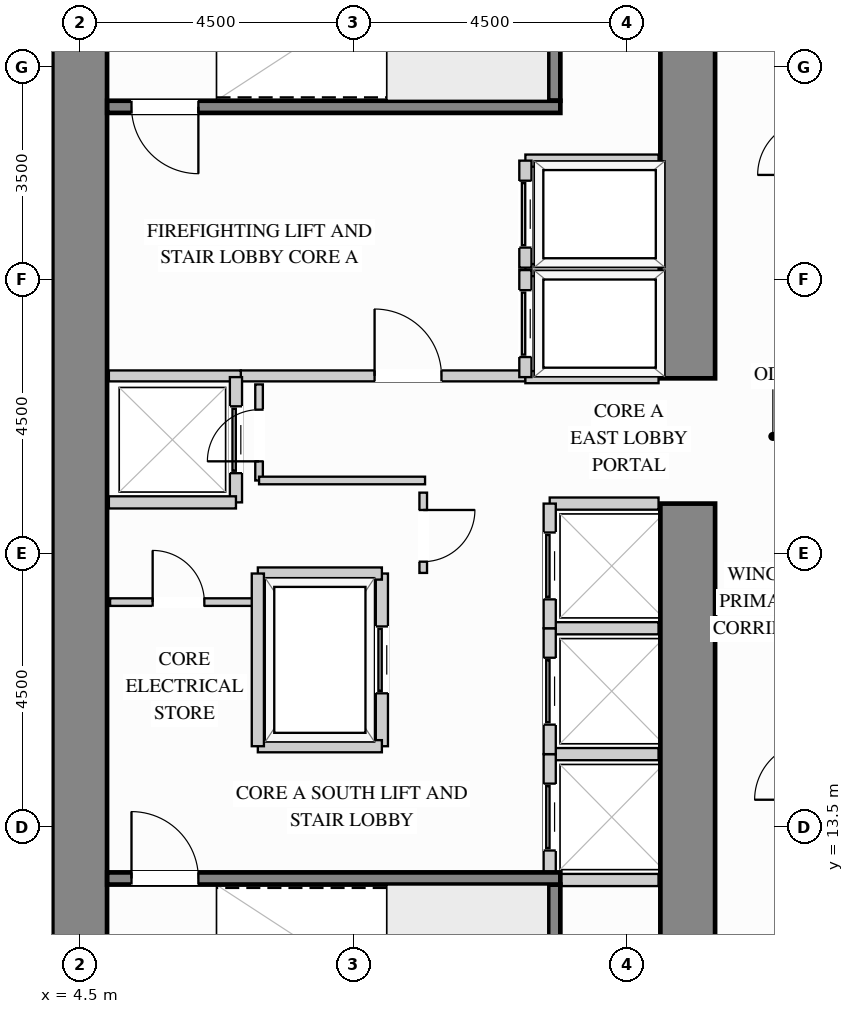
"""IFC4 building model, lengths in metres.
Left out: names, types, materials, properties, quantities, classifications, styles, units other than length and angle.
Written with IfcOpenShell. Run it as: python <this file> out.ifc"""

import sys

from ifc_helpers import new_model, si_unit, direction, frame, frame_2d, origin, place, context, subcontext, project, spatial, rectangle, extrude, source, transform, mapped, element, fill, save


model = new_model("IFC4")
c1 = context("Model", 3, precision=1e-05, world=origin(), true_north=direction((0.0, 1.0)))
c2 = subcontext(c1, "Body", "Model", "MODEL_VIEW")
j1 = project(units=[si_unit("LENGTHUNIT", "METRE"), si_unit("PLANEANGLEUNIT", "RADIAN")], contexts=[c1])
p1 = place(None, origin())
s1 = spatial("IfcSite", under=j1, at=p1, CompositionType="ELEMENT")
p2 = place(p1, origin())
s2 = spatial("IfcBuilding", under=s1, at=p2, CompositionType="ELEMENT")
p3 = place(p2, frame((0.0, 0.0, 22.5)))
s3 = spatial("IfcBuildingStorey", under=s2, at=p3, CompositionType="ELEMENT", Elevation=22.5)
m1 = source(origin(), c2, "Body", "SweptSolid", [
    extrude(rectangle(XDim=9.87, YDim=0.9, at=frame_2d((4.935, 0.0))), origin(), (0.0, 0.0, 1.0), 3.38),
])
p4 = place(p3, frame((14.5, 8.95, 0.0), z_axis=(0.0, 0.0, 1.0), x_axis=(0.0, 1.0, 0.0)))
e1 = element("IfcWall", 1, at=p4, inside=s3, PredefinedType="SHEAR", context=c2, shape_type="MappedRepresentation", body=[
    mapped(m1, transform((0.0, 0.0, 0.0), x_axis=(1.0, 0.0, 0.0), y_axis=(0.0, 1.0, 0.0), z_axis=(0.0, 0.0, 1.0))),
])
m2 = source(origin(), c2, "Body", "SweptSolid", [
    extrude(rectangle(XDim=8.17, YDim=0.9, at=frame_2d((4.085, 0.0))), origin(), (0.0, 0.0, 1.0), 3.38),
])
p5 = place(p3, frame((14.5, 20.88, 0.0), z_axis=(0.0, 0.0, 1.0), x_axis=(0.0, 1.0, 0.0)))
e2 = element("IfcWall", 2, at=p5, inside=s3, PredefinedType="SHEAR", context=c2, shape_type="MappedRepresentation", body=[
    mapped(m2, transform((0.0, 0.0, 0.0), x_axis=(1.0, 0.0, 0.0), y_axis=(0.0, 1.0, 0.0), z_axis=(0.0, 0.0, 1.0))),
])
m3 = source(origin(), c2, "Body", "SweptSolid", [
    extrude(rectangle(XDim=20.1, YDim=0.9, at=frame_2d((10.05, 0.0))), origin(), (0.0, 0.0, 1.0), 3.38),
])
p6 = place(p3, frame((4.5, 8.95, 0.0), z_axis=(0.0, 0.0, 1.0), x_axis=(0.0, 1.0, 0.0)))
e3 = element("IfcWall", 3, at=p6, inside=s3, PredefinedType="SHEAR", context=c2, shape_type="MappedRepresentation", body=[
    mapped(m3, transform((0.0, 0.0, 0.0), x_axis=(1.0, 0.0, 0.0), y_axis=(0.0, 1.0, 0.0), z_axis=(0.0, 0.0, 1.0))),
])
p7 = place(p3, frame((7.15, 20.92, 0.0), z_axis=(0.0, 0.0, 1.0), x_axis=(1.0, 0.0, 0.0)))
e4 = element("IfcWall", 4, at=p7, inside=s3, PredefinedType="PARTITIONING", context=c2, shape_type="SweptSolid", body=[
    extrude(rectangle(XDim=4.68, YDim=0.18, at=frame_2d((2.34, 0.0))), origin(), (0.0, 0.0, 1.0), 3.365),
])
p8 = place(p7, frame((2.2, 0.0, 0.0)))
e5 = element("IfcOpeningElement", 5, at=p8, cuts=e4, PredefinedType="OPENING", context=c2, shape_type="SweptSolid", body=[
    extrude(rectangle(XDim=1.1, YDim=2.15, at=frame_2d((0.55, 1.075))), frame((0.0, 0.1, 0.0), z_axis=(0.0, -1.0, 0.0), x_axis=(1.0, 0.0, 0.0)), (0.0, 0.0, 1.0), 0.2),
])
m4 = source(origin(), c2, "Body", "SweptSolid", [
    extrude(rectangle(XDim=2.17, YDim=0.18, at=frame_2d((1.085, 0.0))), origin(), (0.0, 0.0, 1.0), 3.365),
])
p9 = place(p3, frame((4.98, 20.92, 0.0), z_axis=(0.0, 0.0, 1.0), x_axis=(1.0, 0.0, 0.0)))
e6 = element("IfcWall", 6, at=p9, inside=s3, PredefinedType="PARTITIONING", context=c2, shape_type="MappedRepresentation", body=[
    mapped(m4, transform((0.0, 0.0, 0.0), x_axis=(1.0, 0.0, 0.0), y_axis=(0.0, 1.0, 0.0), z_axis=(0.0, 0.0, 1.0))),
])
p10 = place(p3, frame((10.15, 17.68, 0.0), z_axis=(0.0, 0.0, 1.0), x_axis=(0.0, 1.0, 0.0)))
e7 = element("IfcWall", 7, at=p10, inside=s3, PredefinedType="PARTITIONING", context=c2, shape_type="SweptSolid", body=[
    extrude(rectangle(XDim=1.32, YDim=0.125, at=frame_2d((0.66, 0.0))), origin(), (0.0, 0.0, 1.0), 3.365),
])
p11 = place(p10, frame((0.185, 0.0, 0.0)))
e8 = element("IfcOpeningElement", 8, at=p11, cuts=e7, PredefinedType="OPENING", context=c2, shape_type="SweptSolid", body=[
    extrude(rectangle(XDim=0.85, YDim=2.1, at=frame_2d((0.425, 1.05))), frame((0.0, 0.073, 0.0), z_axis=(0.0, -1.0, 0.0), x_axis=(1.0, 0.0, 0.0)), (0.0, 0.0, 1.0), 0.145),
])
p12 = place(p3, frame((7.45, 19.2, 0.0), z_axis=(0.0, 0.0, 1.0), x_axis=(0.0, 1.0, 0.0)))
e9 = element("IfcWall", 9, at=p12, inside=s3, PredefinedType="PARTITIONING", context=c2, shape_type="SweptSolid", body=[
    extrude(rectangle(XDim=1.58, YDim=0.125, at=frame_2d((0.79, 0.0))), origin(), (0.0, 0.0, 1.0), 3.365),
])
p13 = place(p12, frame((0.315, 0.0, 0.0)))
e10 = element("IfcOpeningElement", 10, at=p13, cuts=e9, PredefinedType="OPENING", context=c2, shape_type="SweptSolid", body=[
    extrude(rectangle(XDim=0.85, YDim=2.1, at=frame_2d((0.425, 1.05))), frame((0.0, 0.073, 0.0), z_axis=(0.0, -1.0, 0.0), x_axis=(1.0, 0.0, 0.0)), (0.0, 0.0, 1.0), 0.145),
])
m5 = source(origin(), c2, "Body", "SweptSolid", [
    extrude(rectangle(XDim=2.73, YDim=0.125, at=frame_2d((1.365, 0.0))), origin(), (0.0, 0.0, 1.0), 3.365),
])
p14 = place(p3, frame((7.45, 19.2, 0.0), z_axis=(0.0, 0.0, 1.0), x_axis=(1.0, 0.0, 0.0)))
e11 = element("IfcWall", 11, at=p14, inside=s3, PredefinedType="PARTITIONING", context=c2, shape_type="MappedRepresentation", body=[
    mapped(m5, transform((0.0, 0.0, 0.0), x_axis=(1.0, 0.0, 0.0), y_axis=(0.0, 1.0, 0.0), z_axis=(0.0, 0.0, 1.0))),
])
p15 = place(p3, frame((5.0, 17.2, 0.0), z_axis=(0.0, 0.0, 1.0), x_axis=(1.0, 0.0, 0.0)))
e12 = element("IfcWall", 12, at=p15, inside=s3, PredefinedType="PARTITIONING", context=c2, shape_type="SweptSolid", body=[
    extrude(rectangle(XDim=2.4, YDim=0.125, at=frame_2d((1.2, 0.0))), origin(), (0.0, 0.0, 1.0), 3.365),
])
p16 = place(p15, frame((0.7, 0.0, 0.0)))
e13 = element("IfcOpeningElement", 13, at=p16, cuts=e12, PredefinedType="OPENING", context=c2, shape_type="SweptSolid", body=[
    extrude(rectangle(XDim=0.85, YDim=2.1, at=frame_2d((0.425, 1.05))), frame((0.0, 0.073, 0.0), z_axis=(0.0, -1.0, 0.0), x_axis=(1.0, 0.0, 0.0)), (0.0, 0.0, 1.0), 0.145),
])
m6 = source(origin(), c2, "Body", "SweptSolid", [
    extrude(rectangle(XDim=2.19, YDim=0.2, at=frame_2d((1.095, 0.0))), origin(), (0.0, 0.0, 1.0), 3.365),
])
for number, where, z_axis, x_axis in (
    (14, (11.83, 22.66, 0.0), (0.0, 0.0, 1.0), (1.0, 0.0, 0.0)),
    (15, (11.83, 20.9, 0.0), (0.0, 0.0, 1.0), (1.0, 0.0, 0.0)),
):
    element("IfcWall", number, at=place(p3, frame(where, z_axis=z_axis, x_axis=x_axis)), inside=s3, PredefinedType="PARTITIONING", context=c2, shape_type="MappedRepresentation", body=[
        mapped(m6, transform((0.0, 0.0, 0.0), x_axis=(1.0, 0.0, 0.0), y_axis=(0.0, 1.0, 0.0), z_axis=(0.0, 0.0, 1.0))),
    ])
p17 = place(p3, frame((11.83, 20.9, 0.0), z_axis=(0.0, 0.0, 1.0), x_axis=(0.0, 1.0, 0.0)))
e16 = element("IfcWall", 16, at=p17, inside=s3, PredefinedType="PARTITIONING", context=c2, shape_type="SweptSolid", body=[
    extrude(rectangle(XDim=1.76, YDim=0.2, at=frame_2d((0.88, 0.0))), origin(), (0.0, 0.0, 1.0), 3.365),
])
p18 = place(p17, frame((0.33, 0.0, 0.0)))
e17 = element("IfcOpeningElement", 17, at=p18, cuts=e16, PredefinedType="OPENING", context=c2, shape_type="SweptSolid", body=[
    extrude(rectangle(XDim=1.1, YDim=2.2, at=frame_2d((0.55, 1.1))), frame((0.0, 0.11, 0.0), z_axis=(0.0, -1.0, 0.0), x_axis=(1.0, 0.0, 0.0)), (0.0, 0.0, 1.0), 0.22),
])
p19 = place(p3, frame((11.83, 24.46, 0.0), z_axis=(0.0, 0.0, 1.0), x_axis=(1.0, 0.0, 0.0)))
e18 = element("IfcWall", 18, at=p19, inside=s3, PredefinedType="PARTITIONING", context=c2, shape_type="MappedRepresentation", body=[
    mapped(m6, transform((0.0, 0.0, 0.0), x_axis=(1.0, 0.0, 0.0), y_axis=(0.0, 1.0, 0.0), z_axis=(0.0, 0.0, 1.0))),
])
p20 = place(p3, frame((11.83, 22.7, 0.0), z_axis=(0.0, 0.0, 1.0), x_axis=(0.0, 1.0, 0.0)))
e19 = element("IfcWall", 19, at=p20, inside=s3, PredefinedType="PARTITIONING", context=c2, shape_type="SweptSolid", body=[
    extrude(rectangle(XDim=1.76, YDim=0.2, at=frame_2d((0.88, 0.0))), origin(), (0.0, 0.0, 1.0), 3.365),
])
p21 = place(p20, frame((0.33, 0.0, 0.0)))
e20 = element("IfcOpeningElement", 20, at=p21, cuts=e19, PredefinedType="OPENING", context=c2, shape_type="SweptSolid", body=[
    extrude(rectangle(XDim=1.1, YDim=2.2, at=frame_2d((0.55, 1.1))), frame((0.0, 0.11, 0.0), z_axis=(0.0, -1.0, 0.0), x_axis=(1.0, 0.0, 0.0)), (0.0, 0.0, 1.0), 0.22),
])
m7 = source(origin(), c2, "Body", "SweptSolid", [
    extrude(rectangle(XDim=1.79, YDim=0.2, at=frame_2d((0.895, 0.0))), origin(), (0.0, 0.0, 1.0), 3.365),
])
for number, where, z_axis, x_axis in (
    (21, (12.23, 14.7, 0.0), (0.0, 0.0, 1.0), (1.0, 0.0, 0.0)),
    (22, (12.23, 12.63, 0.0), (0.0, 0.0, 1.0), (1.0, 0.0, 0.0)),
):
    element("IfcWall", number, at=place(p3, frame(where, z_axis=z_axis, x_axis=x_axis)), inside=s3, PredefinedType="PARTITIONING", context=c2, shape_type="MappedRepresentation", body=[
        mapped(m7, transform((0.0, 0.0, 0.0), x_axis=(1.0, 0.0, 0.0), y_axis=(0.0, 1.0, 0.0), z_axis=(0.0, 0.0, 1.0))),
    ])
p22 = place(p3, frame((12.23, 12.63, 0.0), z_axis=(0.0, 0.0, 1.0), x_axis=(0.0, 1.0, 0.0)))
e23 = element("IfcWall", 23, at=p22, inside=s3, PredefinedType="PARTITIONING", context=c2, shape_type="SweptSolid", body=[
    extrude(rectangle(XDim=2.07, YDim=0.2, at=frame_2d((1.035, 0.0))), origin(), (0.0, 0.0, 1.0), 3.365),
])
p23 = place(p22, frame((0.485, 0.0, 0.0)))
e24 = element("IfcOpeningElement", 24, at=p23, cuts=e23, PredefinedType="OPENING", context=c2, shape_type="SweptSolid", body=[
    extrude(rectangle(XDim=1.1, YDim=2.2, at=frame_2d((0.55, 1.1))), frame((0.0, 0.11, 0.0), z_axis=(0.0, -1.0, 0.0), x_axis=(1.0, 0.0, 0.0)), (0.0, 0.0, 1.0), 0.22),
])
p24 = place(p3, frame((12.23, 16.77, 0.0), z_axis=(0.0, 0.0, 1.0), x_axis=(1.0, 0.0, 0.0)))
e25 = element("IfcWall", 25, at=p24, inside=s3, PredefinedType="PARTITIONING", context=c2, shape_type="MappedRepresentation", body=[
    mapped(m7, transform((0.0, 0.0, 0.0), x_axis=(1.0, 0.0, 0.0), y_axis=(0.0, 1.0, 0.0), z_axis=(0.0, 0.0, 1.0))),
])
p25 = place(p3, frame((12.23, 14.7, 0.0), z_axis=(0.0, 0.0, 1.0), x_axis=(0.0, 1.0, 0.0)))
e26 = element("IfcWall", 26, at=p25, inside=s3, PredefinedType="PARTITIONING", context=c2, shape_type="SweptSolid", body=[
    extrude(rectangle(XDim=2.07, YDim=0.2, at=frame_2d((1.035, 0.0))), origin(), (0.0, 0.0, 1.0), 3.365),
])
p26 = place(p25, frame((0.485, 0.0, 0.0)))
e27 = element("IfcOpeningElement", 27, at=p26, cuts=e26, PredefinedType="OPENING", context=c2, shape_type="SweptSolid", body=[
    extrude(rectangle(XDim=1.1, YDim=2.2, at=frame_2d((0.55, 1.1))), frame((0.0, 0.11, 0.0), z_axis=(0.0, -1.0, 0.0), x_axis=(1.0, 0.0, 0.0)), (0.0, 0.0, 1.0), 0.22),
])
p27 = place(p3, frame((12.23, 18.82, 0.0), z_axis=(0.0, 0.0, 1.0), x_axis=(1.0, 0.0, 0.0)))
e28 = element("IfcWall", 28, at=p27, inside=s3, PredefinedType="PARTITIONING", context=c2, shape_type="MappedRepresentation", body=[
    mapped(m7, transform((0.0, 0.0, 0.0), x_axis=(1.0, 0.0, 0.0), y_axis=(0.0, 1.0, 0.0), z_axis=(0.0, 0.0, 1.0))),
])
p28 = place(p3, frame((12.23, 16.77, 0.0), z_axis=(0.0, 0.0, 1.0), x_axis=(0.0, 1.0, 0.0)))
e29 = element("IfcWall", 29, at=p28, inside=s3, PredefinedType="PARTITIONING", context=c2, shape_type="SweptSolid", body=[
    extrude(rectangle(XDim=2.05, YDim=0.2, at=frame_2d((1.025, 0.0))), origin(), (0.0, 0.0, 1.0), 3.365),
])
p29 = place(p28, frame((0.475, 0.0, 0.0)))
e30 = element("IfcOpeningElement", 30, at=p29, cuts=e29, PredefinedType="OPENING", context=c2, shape_type="SweptSolid", body=[
    extrude(rectangle(XDim=1.1, YDim=2.2, at=frame_2d((0.55, 1.1))), frame((0.0, 0.11, 0.0), z_axis=(0.0, -1.0, 0.0), x_axis=(1.0, 0.0, 0.0)), (0.0, 0.0, 1.0), 0.22),
])
p30 = place(p3, frame((7.07, 18.84, 0.0), z_axis=(0.0, 0.0, 1.0), x_axis=(0.0, 1.0, 0.0)))
e31 = element("IfcWall", 31, at=p30, inside=s3, PredefinedType="PARTITIONING", context=c2, shape_type="SweptSolid", body=[
    extrude(rectangle(XDim=2.06, YDim=0.2, at=frame_2d((1.03, 0.0))), origin(), (0.0, 0.0, 1.0), 3.365),
])
p31 = place(p30, frame((0.48, 0.0, 0.0)))
e32 = element("IfcOpeningElement", 32, at=p31, cuts=e31, PredefinedType="OPENING", context=c2, shape_type="SweptSolid", body=[
    extrude(rectangle(XDim=1.1, YDim=2.2, at=frame_2d((0.55, 1.1))), frame((0.0, 0.11, 0.0), z_axis=(0.0, -1.0, 0.0), x_axis=(1.0, 0.0, 0.0)), (0.0, 0.0, 1.0), 0.22),
])
m8 = source(origin(), c2, "Body", "SweptSolid", [
    extrude(rectangle(XDim=2.09, YDim=0.2, at=frame_2d((1.045, 0.0))), origin(), (0.0, 0.0, 1.0), 3.365),
])
p32 = place(p3, frame((4.98, 18.84, 0.0), z_axis=(0.0, 0.0, 1.0), x_axis=(1.0, 0.0, 0.0)))
e33 = element("IfcWall", 33, at=p32, inside=s3, PredefinedType="PARTITIONING", context=c2, shape_type="MappedRepresentation", body=[
    mapped(m8, transform((0.0, 0.0, 0.0), x_axis=(1.0, 0.0, 0.0), y_axis=(0.0, 1.0, 0.0), z_axis=(0.0, 0.0, 1.0))),
])
p33 = place(p3, frame((9.47, 14.83, 0.0), z_axis=(0.0, 0.0, 1.0), x_axis=(0.0, 1.0, 0.0)))
e34 = element("IfcWall", 34, at=p33, inside=s3, PredefinedType="PARTITIONING", context=c2, shape_type="SweptSolid", body=[
    extrude(rectangle(XDim=2.84, YDim=0.2, at=frame_2d((1.42, 0.0))), origin(), (0.0, 0.0, 1.0), 3.365),
])
p34 = place(p33, frame((0.87, 0.0, 0.0)))
e35 = element("IfcOpeningElement", 35, at=p34, cuts=e34, PredefinedType="OPENING", context=c2, shape_type="SweptSolid", body=[
    extrude(rectangle(XDim=1.1, YDim=2.2, at=frame_2d((0.55, 1.1))), frame((0.0, 0.11, 0.0), z_axis=(0.0, -1.0, 0.0), x_axis=(1.0, 0.0, 0.0)), (0.0, 0.0, 1.0), 0.22),
])
m9 = source(origin(), c2, "Body", "SweptSolid", [
    extrude(rectangle(XDim=2.04, YDim=0.2, at=frame_2d((1.02, 0.0))), origin(), (0.0, 0.0, 1.0), 3.365),
])
for number, where, z_axis, x_axis in (
    (36, (7.43, 17.67, 0.0), (0.0, 0.0, 1.0), (1.0, 0.0, 0.0)),
    (37, (7.43, 14.83, 0.0), (0.0, 0.0, 1.0), (1.0, 0.0, 0.0)),
):
    element("IfcWall", number, at=place(p3, frame(where, z_axis=z_axis, x_axis=x_axis)), inside=s3, PredefinedType="PARTITIONING", context=c2, shape_type="MappedRepresentation", body=[
        mapped(m9, transform((0.0, 0.0, 0.0), x_axis=(1.0, 0.0, 0.0), y_axis=(0.0, 1.0, 0.0), z_axis=(0.0, 0.0, 1.0))),
    ])
m10 = source(origin(), c2, "Body", "SweptSolid", [
    extrude(rectangle(XDim=2.84, YDim=0.2, at=frame_2d((1.42, 0.0))), origin(), (0.0, 0.0, 1.0), 3.365),
])
p35 = place(p3, frame((7.43, 14.83, 0.0), z_axis=(0.0, 0.0, 1.0), x_axis=(0.0, 1.0, 0.0)))
e38 = element("IfcWall", 38, at=p35, inside=s3, PredefinedType="PARTITIONING", context=c2, shape_type="MappedRepresentation", body=[
    mapped(m10, transform((0.0, 0.0, 0.0), x_axis=(1.0, 0.0, 0.0), y_axis=(0.0, 1.0, 0.0), z_axis=(0.0, 0.0, 1.0))),
])
m11 = source(origin(), c2, "Body", "SweptSolid", [
    extrude(rectangle(XDim=3.603, YDim=0.2, at=frame_2d((1.802, 0.0))), origin(), (0.0, 0.0, 1.0), 3.38),
])
p36 = place(p3, frame((12.305, 8.952, 0.0), z_axis=(0.0, 0.0, 1.0), x_axis=(0.0, 1.0, 0.0)))
e39 = element("IfcWall", 39, at=p36, inside=s3, PredefinedType="SHEAR", context=c2, shape_type="MappedRepresentation", body=[
    mapped(m11, transform((0.0, 0.0, 0.0), x_axis=(1.0, 0.0, 0.0), y_axis=(0.0, 1.0, 0.0), z_axis=(0.0, 0.0, 1.0))),
])
p37 = place(p3, frame((4.952, 12.655, 0.0), z_axis=(0.0, 0.0, 1.0), x_axis=(1.0, 0.0, 0.0)))
e40 = element("IfcWall", 40, at=p37, inside=s3, PredefinedType="SHEAR", context=c2, shape_type="SweptSolid", body=[
    extrude(rectangle(XDim=7.453, YDim=0.2, at=frame_2d((3.727, 0.0))), origin(), (0.0, 0.0, 1.0), 3.38),
])
p38 = place(p37, frame((0.4, 0.0, 0.0)))
e41 = element("IfcOpeningElement", 41, at=p38, cuts=e40, PredefinedType="OPENING", context=c2, shape_type="SweptSolid", body=[
    extrude(rectangle(XDim=1.1, YDim=2.15, at=frame_2d((0.55, 1.075))), frame((0.0, 0.11, 0.0), z_axis=(0.0, -1.0, 0.0), x_axis=(1.0, 0.0, 0.0)), (0.0, 0.0, 1.0), 0.22),
])
p39 = place(p3, frame((12.305, 25.445, 0.0), z_axis=(0.0, 0.0, 1.0), x_axis=(0.0, 1.0, 0.0)))
e42 = element("IfcWall", 42, at=p39, inside=s3, PredefinedType="SHEAR", context=c2, shape_type="MappedRepresentation", body=[
    mapped(m11, transform((0.0, 0.0, 0.0), x_axis=(1.0, 0.0, 0.0), y_axis=(0.0, 1.0, 0.0), z_axis=(0.0, 0.0, 1.0))),
])
p40 = place(p3, frame((4.952, 25.345, 0.0), z_axis=(0.0, 0.0, 1.0), x_axis=(1.0, 0.0, 0.0)))
e43 = element("IfcWall", 43, at=p40, inside=s3, PredefinedType="SHEAR", context=c2, shape_type="SweptSolid", body=[
    extrude(rectangle(XDim=7.453, YDim=0.2, at=frame_2d((3.727, 0.0))), origin(), (0.0, 0.0, 1.0), 3.38),
])
p41 = place(p40, frame((0.4, 0.0, 0.0)))
e44 = element("IfcOpeningElement", 44, at=p41, cuts=e43, PredefinedType="OPENING", context=c2, shape_type="SweptSolid", body=[
    extrude(rectangle(XDim=1.1, YDim=2.15, at=frame_2d((0.55, 1.075))), frame((0.0, 0.11, 0.0), z_axis=(0.0, -1.0, 0.0), x_axis=(1.0, 0.0, 0.0)), (0.0, 0.0, 1.0), 0.22),
])
m12 = source(origin(), c2, "Body", "SweptSolid", [
    extrude(rectangle(XDim=1.1, YDim=2.15, at=frame_2d((0.55, 1.075))), frame((0.0, 0.025, 0.0), z_axis=(0.0, -1.0, 0.0), x_axis=(1.0, 0.0, 0.0)), (0.0, 0.0, 1.0), 0.05),
])
p42 = place(p8, origin())
e45 = element("IfcDoor", 45, at=p42, inside=s3, OperationType="SINGLE_SWING_LEFT", PredefinedType="DOOR", context=c2, shape_type="MappedRepresentation", body=[
    mapped(m12, transform((0.0, 0.0, 0.0), x_axis=(1.0, 0.0, 0.0), y_axis=(0.0, 1.0, 0.0), z_axis=(0.0, 0.0, 1.0))),
])
fill(e5, e45)
m13 = source(origin(), c2, "Body", "SweptSolid", [
    extrude(rectangle(XDim=1.1, YDim=2.2, at=frame_2d((0.55, 1.1))), frame((0.0, 0.025, 0.0), z_axis=(0.0, -1.0, 0.0), x_axis=(1.0, 0.0, 0.0)), (0.0, 0.0, 1.0), 0.05),
])
p43 = place(p18, origin())
e46 = element("IfcDoor", 46, at=p43, inside=s3, OperationType="SLIDING_TO_LEFT", PredefinedType="DOOR", context=c2, shape_type="MappedRepresentation", body=[
    mapped(m13, transform((0.0, 0.0, 0.0), x_axis=(1.0, 0.0, 0.0), y_axis=(0.0, 1.0, 0.0), z_axis=(0.0, 0.0, 1.0))),
])
fill(e17, e46)
p44 = place(p21, origin())
e47 = element("IfcDoor", 47, at=p44, inside=s3, OperationType="SLIDING_TO_LEFT", PredefinedType="DOOR", context=c2, shape_type="MappedRepresentation", body=[
    mapped(m13, transform((0.0, 0.0, 0.0), x_axis=(1.0, 0.0, 0.0), y_axis=(0.0, 1.0, 0.0), z_axis=(0.0, 0.0, 1.0))),
])
fill(e20, e47)
p45 = place(p23, origin())
e48 = element("IfcDoor", 48, at=p45, inside=s3, OperationType="SLIDING_TO_LEFT", PredefinedType="DOOR", context=c2, shape_type="MappedRepresentation", body=[
    mapped(m13, transform((0.0, 0.0, 0.0), x_axis=(1.0, 0.0, 0.0), y_axis=(0.0, 1.0, 0.0), z_axis=(0.0, 0.0, 1.0))),
])
fill(e24, e48)
p46 = place(p26, origin())
e49 = element("IfcDoor", 49, at=p46, inside=s3, OperationType="SLIDING_TO_LEFT", PredefinedType="DOOR", context=c2, shape_type="MappedRepresentation", body=[
    mapped(m13, transform((0.0, 0.0, 0.0), x_axis=(1.0, 0.0, 0.0), y_axis=(0.0, 1.0, 0.0), z_axis=(0.0, 0.0, 1.0))),
])
fill(e27, e49)
p47 = place(p29, origin())
e50 = element("IfcDoor", 50, at=p47, inside=s3, OperationType="SLIDING_TO_LEFT", PredefinedType="DOOR", context=c2, shape_type="MappedRepresentation", body=[
    mapped(m13, transform((0.0, 0.0, 0.0), x_axis=(1.0, 0.0, 0.0), y_axis=(0.0, 1.0, 0.0), z_axis=(0.0, 0.0, 1.0))),
])
fill(e30, e50)
p48 = place(p31, origin())
e51 = element("IfcDoor", 51, at=p48, inside=s3, OperationType="SLIDING_TO_LEFT", PredefinedType="DOOR", context=c2, shape_type="MappedRepresentation", body=[
    mapped(m13, transform((0.0, 0.0, 0.0), x_axis=(1.0, 0.0, 0.0), y_axis=(0.0, 1.0, 0.0), z_axis=(0.0, 0.0, 1.0))),
])
fill(e32, e51)
p49 = place(p34, origin())
e52 = element("IfcDoor", 52, at=p49, inside=s3, OperationType="SLIDING_TO_LEFT", PredefinedType="DOOR", context=c2, shape_type="MappedRepresentation", body=[
    mapped(m13, transform((0.0, 0.0, 0.0), x_axis=(1.0, 0.0, 0.0), y_axis=(0.0, 1.0, 0.0), z_axis=(0.0, 0.0, 1.0))),
])
fill(e35, e52)
m14 = source(origin(), c2, "Body", "SweptSolid", [
    extrude(rectangle(XDim=0.85, YDim=2.1, at=frame_2d((0.425, 1.05))), frame((0.0, 0.025, 0.0), z_axis=(0.0, -1.0, 0.0), x_axis=(1.0, 0.0, 0.0)), (0.0, 0.0, 1.0), 0.05),
])
p50 = place(p11, origin())
e53 = element("IfcDoor", 53, at=p50, inside=s3, OperationType="SINGLE_SWING_RIGHT", PredefinedType="DOOR", context=c2, shape_type="MappedRepresentation", body=[
    mapped(m14, transform((0.0, 0.0, 0.0), x_axis=(1.0, 0.0, 0.0), y_axis=(0.0, 1.0, 0.0), z_axis=(0.0, 0.0, 1.0))),
])
fill(e8, e53)
p51 = place(p16, origin())
e54 = element("IfcDoor", 54, at=p51, inside=s3, OperationType="SINGLE_SWING_LEFT", PredefinedType="DOOR", context=c2, shape_type="MappedRepresentation", body=[
    mapped(m14, transform((0.0, 0.0, 0.0), x_axis=(1.0, 0.0, 0.0), y_axis=(0.0, 1.0, 0.0), z_axis=(0.0, 0.0, 1.0))),
])
fill(e13, e54)
p52 = place(p13, origin())
e55 = element("IfcDoor", 55, at=p52, inside=s3, OperationType="SINGLE_SWING_LEFT", PredefinedType="DOOR", context=c2, shape_type="MappedRepresentation", body=[
    mapped(m14, transform((0.0, 0.0, 0.0), x_axis=(1.0, 0.0, 0.0), y_axis=(0.0, 1.0, 0.0), z_axis=(0.0, 0.0, 1.0))),
])
fill(e10, e55)
m15 = source(origin(), c2, "Body", "SweptSolid", [
    extrude(rectangle(XDim=1.1, YDim=2.15, at=frame_2d((0.55, 1.075))), frame((0.0, 0.025, 0.0), z_axis=(0.0, -1.0, 0.0), x_axis=(1.0, 0.0, 0.0)), (0.0, 0.0, 1.0), 0.05),
])
p53 = place(p38, origin())
e56 = element("IfcDoor", 56, at=p53, inside=s3, OperationType="SINGLE_SWING_LEFT", PredefinedType="DOOR", context=c2, shape_type="MappedRepresentation", body=[
    mapped(m15, transform((0.0, 0.0, 0.0), x_axis=(1.0, 0.0, 0.0), y_axis=(0.0, 1.0, 0.0), z_axis=(0.0, 0.0, 1.0))),
])
fill(e41, e56)
p54 = place(p41, origin())
e57 = element("IfcDoor", 57, at=p54, inside=s3, OperationType="SINGLE_SWING_RIGHT", PredefinedType="DOOR", context=c2, shape_type="MappedRepresentation", body=[
    mapped(m15, transform((0.0, 0.0, 0.0), x_axis=(1.0, 0.0, 0.0), y_axis=(0.0, 1.0, 0.0), z_axis=(0.0, 0.0, 1.0))),
])
fill(e44, e57)
save(model, sys.argv[1])
